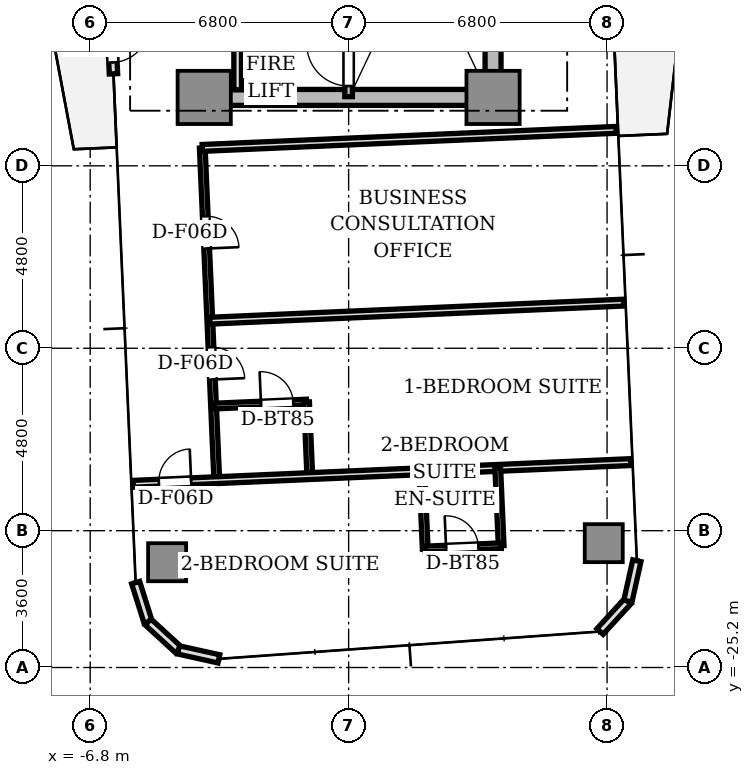
"""IFC4 building model, lengths in metres.
Left out: names, types, materials, properties, quantities, classifications, styles, units other than length and angle.
Written with IfcOpenShell. Run it as: python <this file> out.ifc"""

import sys

from ifc_helpers import new_model, si_unit, direction, frame, frame_2d, origin, origin_2d, place, context, subcontext, project, spatial, rectangle, extrude, source, transform, mapped, element, fill, save


model = new_model("IFC4")
c1 = context("Model", 3, precision=1e-05, world=origin(), true_north=direction((0.0, 1.0)))
c2 = subcontext(c1, "Body", "Model", "MODEL_VIEW")
j1 = project(units=[si_unit("LENGTHUNIT", "METRE"), si_unit("PLANEANGLEUNIT", "RADIAN")], contexts=[c1])
p1 = place(None, origin())
s1 = spatial("IfcSite", under=j1, at=p1, CompositionType="ELEMENT")
p2 = place(p1, origin())
s2 = spatial("IfcBuilding", under=s1, at=p2, CompositionType="ELEMENT")
p3 = place(p2, frame((0.0, 0.0, 134.9)))
s3 = spatial("IfcBuildingStorey", under=s2, at=p3, CompositionType="ELEMENT", Elevation=134.9)
p4 = place(p3, frame((-3.55, -10.2, 0.0), z_axis=(0.0, 0.0, 1.0), x_axis=(1.0, 0.0, 0.0)))
e1 = element("IfcWall", 1, at=p4, inside=s3, PredefinedType="SHEAR", context=c2, shape_type="SweptSolid", body=[
    extrude(rectangle(XDim=7.1, YDim=0.42, at=frame_2d((3.55, 0.0))), origin(), (0.0, 0.0, 1.0), 3.03),
])
p5 = place(p3, frame((3.8, -9.75, 0.0), z_axis=(0.0, 0.0, 1.0), x_axis=(0.0, 1.0, 0.0)))
e2 = element("IfcWall", 2, at=p5, inside=s3, PredefinedType="SHEAR", context=c2, shape_type="SweptSolid", body=[
    extrude(rectangle(XDim=6.9, YDim=0.42, at=frame_2d((3.45, 0.0))), origin(), (0.0, 0.0, 1.0), 3.03),
])
m1 = source(origin(), c2, "Body", "SweptSolid", [
    extrude(rectangle(XDim=1.4, YDim=1.4, at=origin_2d()), origin(), (0.0, 0.0, 1.0), 3.03),
])
for number, where, z_axis, x_axis in (
    (3, (-3.8, -10.2, 0.0), (0.0, 0.0, 1.0), (1.0, 0.0, 0.0)),
    (4, (3.8, -10.2, 0.0), (0.0, 0.0, 1.0), (1.0, 0.0, 0.0)),
):
    element("IfcColumn", number, at=place(p3, frame(where, z_axis=z_axis, x_axis=x_axis)), inside=s3, PredefinedType="COLUMN", context=c2, shape_type="MappedRepresentation", body=[
        mapped(m1, transform((0.0, 0.0, 0.0), scale=1.0)),
    ])
m2 = source(origin(), c2, "Body", "SweptSolid", [
    extrude(rectangle(XDim=1.0, YDim=1.0, at=origin_2d()), origin(), (0.0, 0.0, 1.0), 3.03),
])
for number, where, z_axis, x_axis in (
    (5, (-4.776, -22.43, 0.0), (0.0, 0.0, 1.0), (1.0, 0.0, 0.0)),
    (6, (6.713, -21.928, 0.0), (0.0, 0.0, 1.0), (1.0, 0.0, 0.0)),
):
    element("IfcColumn", number, at=place(p3, frame(where, z_axis=z_axis, x_axis=x_axis)), inside=s3, PredefinedType="COLUMN", context=c2, shape_type="MappedRepresentation", body=[
        mapped(m2, transform((0.0, 0.0, 0.0), scale=1.0)),
    ])
p6 = place(p3, frame((-6.306, -6.882, 0.0), z_axis=(0.0, 0.0, 1.0), x_axis=(0.043672655174, -0.999045894436, 0.0)))
e7 = element("IfcWall", 7, at=p6, inside=s3, PredefinedType="STANDARD", context=c2, shape_type="SweptSolid", body=[
    extrude(rectangle(XDim=2.7, YDim=0.22, at=frame_2d((1.35, 0.0))), origin(), (0.0, 0.0, 1.0), 3.03),
])
p7 = place(p6, frame((1.4, 0.0, 0.0)))
e8 = element("IfcOpeningElement", 8, at=p7, cuts=e7, PredefinedType="OPENING", context=c2, shape_type="SweptSolid", body=[
    extrude(rectangle(XDim=1.0, YDim=2.2, at=frame_2d((0.5, 1.1))), frame((0.0, 0.12, 0.0), z_axis=(0.0, -1.0, 0.0), x_axis=(1.0, 0.0, 0.0)), (0.0, 0.0, 1.0), 0.24),
])
p8 = place(p3, frame((-5.604, -22.966, 0.0), z_axis=(0.0, 0.0, 1.0), x_axis=(0.300755105707, -0.953701403161, 0.0)))
e9 = element("IfcWall", 9, at=p8, inside=s3, PredefinedType="STANDARD", context=c2, shape_type="SweptSolid", body=[
    extrude(rectangle(XDim=1.087, YDim=0.22, at=frame_2d((0.543, 0.0))), origin(), (0.0, 0.0, 1.0), 3.03),
])
p9 = place(p3, frame((-5.277, -24.003, 0.0), z_axis=(0.0, 0.0, 1.0), x_axis=(0.737312600672, -0.675551721847, 0.0)))
e10 = element("IfcWall", 10, at=p9, inside=s3, PredefinedType="STANDARD", context=c2, shape_type="SweptSolid", body=[
    extrude(rectangle(XDim=1.087, YDim=0.22, at=frame_2d((0.543, 0.0))), origin(), (0.0, 0.0, 1.0), 3.03),
])
for number, where, z_axis, x_axis in (
    (11, (-4.475, -24.737, 0.0), (0.0, 0.0, 1.0), (0.976, -0.217, 0.0)),
    (12, (6.614, -24.253, 0.0), (0.0, 0.0, 1.0), (0.676, 0.737, 0.0)),
):
    element("IfcWall", number, at=place(p3, frame(where, z_axis=z_axis, x_axis=x_axis)), inside=s3, PredefinedType="STANDARD", context=c2, shape_type="SweptSolid", body=[
        extrude(rectangle(XDim=1.087, YDim=0.22, at=frame_2d((0.543, 0.0))), origin(), (0.0, 0.0, 1.0), 3.03),
    ])
p10 = place(p3, frame((7.349, -23.452, 0.0), z_axis=(0.0, 0.0, 1.0), x_axis=(0.216454939174, 0.976292609471, 0.0)))
e13 = element("IfcWall", 13, at=p10, inside=s3, PredefinedType="STANDARD", context=c2, shape_type="SweptSolid", body=[
    extrude(rectangle(XDim=1.087, YDim=0.22, at=frame_2d((0.544, 0.0))), origin(), (0.0, 0.0, 1.0), 3.03),
])
p11 = place(p3, frame((0.0, -10.18, 0.0), z_axis=(0.0, 0.0, 1.0), x_axis=(0.0, 1.0, 0.0)))
e14 = element("IfcWall", 14, at=p11, inside=s3, PredefinedType="SOLIDWALL", context=c2, shape_type="SweptSolid", body=[
    extrude(rectangle(XDim=7.68, YDim=0.2, at=frame_2d((3.84, 0.0))), origin(), (0.0, 0.0, 1.0), 3.03),
])
p12 = place(p11, frame((0.28, 0.0, 0.0)))
e15 = element("IfcOpeningElement", 15, at=p12, cuts=e14, PredefinedType="OPENING", context=c2, shape_type="SweptSolid", body=[
    extrude(rectangle(XDim=1.1, YDim=2.15, at=frame_2d((0.55, 1.075))), frame((0.0, 0.11, 0.0), z_axis=(0.0, -1.0, 0.0), x_axis=(1.0, 0.0, 0.0)), (0.0, 0.0, 1.0), 0.22),
])
p13 = place(p3, frame((-2.92, -10.0, 0.0), z_axis=(0.0, 0.0, 1.0), x_axis=(0.0, 1.0, 0.0)))
e16 = element("IfcWall", 16, at=p13, inside=s3, PredefinedType="SOLIDWALL", context=c2, shape_type="SweptSolid", body=[
    extrude(rectangle(XDim=1.44, YDim=0.2, at=frame_2d((0.72, 0.0))), origin(), (0.0, 0.0, 1.0), 2.58),
])
p14 = place(p3, frame((-3.851, -11.529, 0.0), z_axis=(0.0, 0.0, 1.0), x_axis=(0.043638220751, -0.999047399121, 0.0)))
e17 = element("IfcWall", 17, at=p14, inside=s3, PredefinedType="PARTITIONING", context=c2, shape_type="SweptSolid", body=[
    extrude(rectangle(XDim=8.75, YDim=0.15, at=frame_2d((4.375, 0.0))), origin(), (0.0, 0.0, 1.0), 2.55),
])
p15 = place(p14, frame((1.8, 0.0, 0.0)))
e18 = element("IfcOpeningElement", 18, at=p15, cuts=e17, PredefinedType="OPENING", context=c2, shape_type="SweptSolid", body=[
    extrude(rectangle(XDim=0.85, YDim=2.1, at=frame_2d((0.425, 1.05))), frame((0.0, 0.085, 0.0), z_axis=(0.0, -1.0, 0.0), x_axis=(1.0, 0.0, 0.0)), (0.0, 0.0, 1.0), 0.17),
])
p16 = place(p14, frame((5.25, 0.0, 0.0)))
e19 = element("IfcOpeningElement", 19, at=p16, cuts=e17, PredefinedType="OPENING", context=c2, shape_type="SweptSolid", body=[
    extrude(rectangle(XDim=0.85, YDim=2.1, at=frame_2d((0.425, 1.05))), frame((0.0, 0.085, 0.0), z_axis=(0.0, -1.0, 0.0), x_axis=(1.0, 0.0, 0.0)), (0.0, 0.0, 1.0), 0.17),
])
p17 = place(p3, frame((-3.851, -11.529, 0.0), z_axis=(0.0, 0.0, 1.0), x_axis=(0.999048663393, 0.043609267053, 0.0)))
e20 = element("IfcWall", 20, at=p17, inside=s3, PredefinedType="PARTITIONING", context=c2, shape_type="SweptSolid", body=[
    extrude(rectangle(XDim=10.9, YDim=0.18, at=frame_2d((5.45, 0.0))), origin(), (0.0, 0.0, 1.0), 2.58),
])
p18 = place(p3, frame((-3.652, -16.075, 0.0), z_axis=(0.0, 0.0, 1.0), x_axis=(0.999047687305, 0.043631622609, 0.0)))
e21 = element("IfcWall", 21, at=p18, inside=s3, PredefinedType="PARTITIONING", context=c2, shape_type="SweptSolid", body=[
    extrude(rectangle(XDim=10.9, YDim=0.18, at=frame_2d((5.45, 0.0))), origin(), (0.0, 0.0, 1.0), 2.58),
])
p19 = place(p3, frame((-3.554, -18.323, 0.0), z_axis=(0.0, 0.0, 1.0), x_axis=(0.999047112283, 0.043644787072, 0.0)))
e22 = element("IfcWall", 22, at=p19, inside=s3, PredefinedType="PARTITIONING", context=c2, shape_type="SweptSolid", body=[
    extrude(rectangle(XDim=2.45, YDim=0.15, at=frame_2d((1.225, 0.0))), origin(), (0.0, 0.0, 1.0), 2.58),
])
p20 = place(p19, frame((1.25, 0.0, 0.0)))
e23 = element("IfcOpeningElement", 23, at=p20, cuts=e22, PredefinedType="OPENING", context=c2, shape_type="SweptSolid", body=[
    extrude(rectangle(XDim=0.85, YDim=2.1, at=frame_2d((0.425, 1.05))), frame((0.0, 0.085, 0.0), z_axis=(0.0, -1.0, 0.0), x_axis=(1.0, 0.0, 0.0)), (0.0, 0.0, 1.0), 0.17),
])
p21 = place(p3, frame((-1.106, -18.216, 0.0), z_axis=(0.0, 0.0, 1.0), x_axis=(0.043567614947, -0.99905048067, 0.0)))
e24 = element("IfcWall", 24, at=p21, inside=s3, PredefinedType="PARTITIONING", context=c2, shape_type="SweptSolid", body=[
    extrude(rectangle(XDim=1.95, YDim=0.15, at=frame_2d((0.975, 0.0))), origin(), (0.0, 0.0, 1.0), 2.58),
])
p22 = place(p3, frame((-5.667, -20.367, 0.0), z_axis=(0.0, 0.0, 1.0), x_axis=(0.999047806124, 0.043628901879, 0.0)))
e25 = element("IfcWall", 25, at=p22, inside=s3, PredefinedType="PARTITIONING", context=c2, shape_type="SweptSolid", body=[
    extrude(rectangle(XDim=13.1, YDim=0.18, at=frame_2d((6.55, 0.0))), origin(), (0.0, 0.0, 1.0), 2.58),
])
p23 = place(p22, frame((0.675, 0.0, 0.0)))
e26 = element("IfcOpeningElement", 26, at=p23, cuts=e25, PredefinedType="OPENING", context=c2, shape_type="SweptSolid", body=[
    extrude(rectangle(XDim=0.85, YDim=2.1, at=frame_2d((0.425, 1.05))), frame((0.0, 0.1, 0.0), z_axis=(0.0, -1.0, 0.0), x_axis=(1.0, 0.0, 0.0)), (0.0, 0.0, 1.0), 0.2),
])
p24 = place(p3, frame((3.924, -19.948, 0.0), z_axis=(0.0, 0.0, 1.0), x_axis=(0.043587097972, -0.999049630844, 0.0)))
e27 = element("IfcWall", 27, at=p24, inside=s3, PredefinedType="PARTITIONING", context=c2, shape_type="SweptSolid", body=[
    extrude(rectangle(XDim=2.05, YDim=0.15, at=frame_2d((1.025, 0.0))), origin(), (0.0, 0.0, 1.0), 2.58),
])
p25 = place(p3, frame((1.926, -20.035, 0.0), z_axis=(0.0, 0.0, 1.0), x_axis=(0.043592284462, -0.999049404552, 0.0)))
e28 = element("IfcWall", 28, at=p25, inside=s3, PredefinedType="PARTITIONING", context=c2, shape_type="SweptSolid", body=[
    extrude(rectangle(XDim=2.05, YDim=0.15, at=frame_2d((1.025, 0.0))), origin(), (0.0, 0.0, 1.0), 2.58),
])
p26 = place(p3, frame((2.015, -22.083, 0.0), z_axis=(0.0, 0.0, 1.0), x_axis=(0.999049929275, 0.043580257179, 0.0)))
e29 = element("IfcWall", 29, at=p26, inside=s3, PredefinedType="PARTITIONING", context=c2, shape_type="SweptSolid", body=[
    extrude(rectangle(XDim=2.0, YDim=0.15, at=frame_2d((1.0, 0.0))), origin(), (0.0, 0.0, 1.0), 2.5),
])
p27 = place(p26, frame((0.55, 0.0, 0.0)))
e30 = element("IfcOpeningElement", 30, at=p27, cuts=e29, PredefinedType="OPENING", context=c2, shape_type="SweptSolid", body=[
    extrude(rectangle(XDim=0.85, YDim=2.1, at=frame_2d((0.425, 1.05))), frame((0.0, 0.085, 0.0), z_axis=(0.0, -1.0, 0.0), x_axis=(1.0, 0.0, 0.0)), (0.0, 0.0, 1.0), 0.17),
])
m3 = source(origin(), c2, "Body", "SweptSolid", [
    extrude(rectangle(XDim=1.0, YDim=0.05, at=origin_2d()), origin(), (0.0, 0.0, 1.0), 2.2),
])
p28 = place(p7, frame((0.5, 0.0, 0.0)))
e31 = element("IfcDoor", 31, at=p28, inside=s3, OperationType="SINGLE_SWING_LEFT", PredefinedType="DOOR", context=c2, shape_type="MappedRepresentation", body=[
    mapped(m3, transform((0.0, 0.0, 0.0), scale=1.0)),
])
fill(e8, e31)
m4 = source(origin(), c2, "Body", "SweptSolid", [
    extrude(rectangle(XDim=1.1, YDim=0.05, at=origin_2d()), origin(), (0.0, 0.0, 1.0), 2.15),
])
p29 = place(p12, frame((0.55, 0.0, 0.0)))
e32 = element("IfcDoor", 32, at=p29, inside=s3, OperationType="SINGLE_SWING_RIGHT", PredefinedType="DOOR", context=c2, shape_type="MappedRepresentation", body=[
    mapped(m4, transform((0.0, 0.0, 0.0), scale=1.0)),
])
fill(e15, e32)
m5 = source(origin(), c2, "Body", "SweptSolid", [
    extrude(rectangle(XDim=0.85, YDim=0.05, at=origin_2d()), origin(), (0.0, 0.0, 1.0), 2.1),
])
p30 = place(p15, frame((0.425, 0.0, 0.0)))
e33 = element("IfcDoor", 33, at=p30, inside=s3, OperationType="SINGLE_SWING_RIGHT", PredefinedType="DOOR", context=c2, shape_type="MappedRepresentation", body=[
    mapped(m5, transform((0.0, 0.0, 0.0), scale=1.0)),
])
fill(e18, e33)
p31 = place(p20, frame((0.425, 0.0, 0.0)))
e34 = element("IfcDoor", 34, at=p31, inside=s3, OperationType="SINGLE_SWING_LEFT", PredefinedType="DOOR", context=c2, shape_type="MappedRepresentation", body=[
    mapped(m5, transform((0.0, 0.0, 0.0), scale=1.0)),
])
fill(e23, e34)
p32 = place(p16, frame((0.425, 0.0, 0.0)))
e35 = element("IfcDoor", 35, at=p32, inside=s3, OperationType="SINGLE_SWING_RIGHT", PredefinedType="DOOR", context=c2, shape_type="MappedRepresentation", body=[
    mapped(m5, transform((0.0, 0.0, 0.0), scale=1.0)),
])
fill(e19, e35)
p33 = place(p27, frame((0.425, 0.0, 0.0)))
e36 = element("IfcDoor", 36, at=p33, inside=s3, OperationType="SINGLE_SWING_LEFT", PredefinedType="DOOR", context=c2, shape_type="MappedRepresentation", body=[
    mapped(m5, transform((0.0, 0.0, 0.0), scale=1.0)),
])
fill(e30, e36)
p34 = place(p23, frame((0.425, 0.0, 0.0)))
e37 = element("IfcDoor", 37, at=p34, inside=s3, OperationType="SINGLE_SWING_RIGHT", PredefinedType="DOOR", context=c2, shape_type="MappedRepresentation", body=[
    mapped(m5, transform((0.0, 0.0, 0.0), scale=1.0)),
])
fill(e26, e37)
save(model, sys.argv[1])
